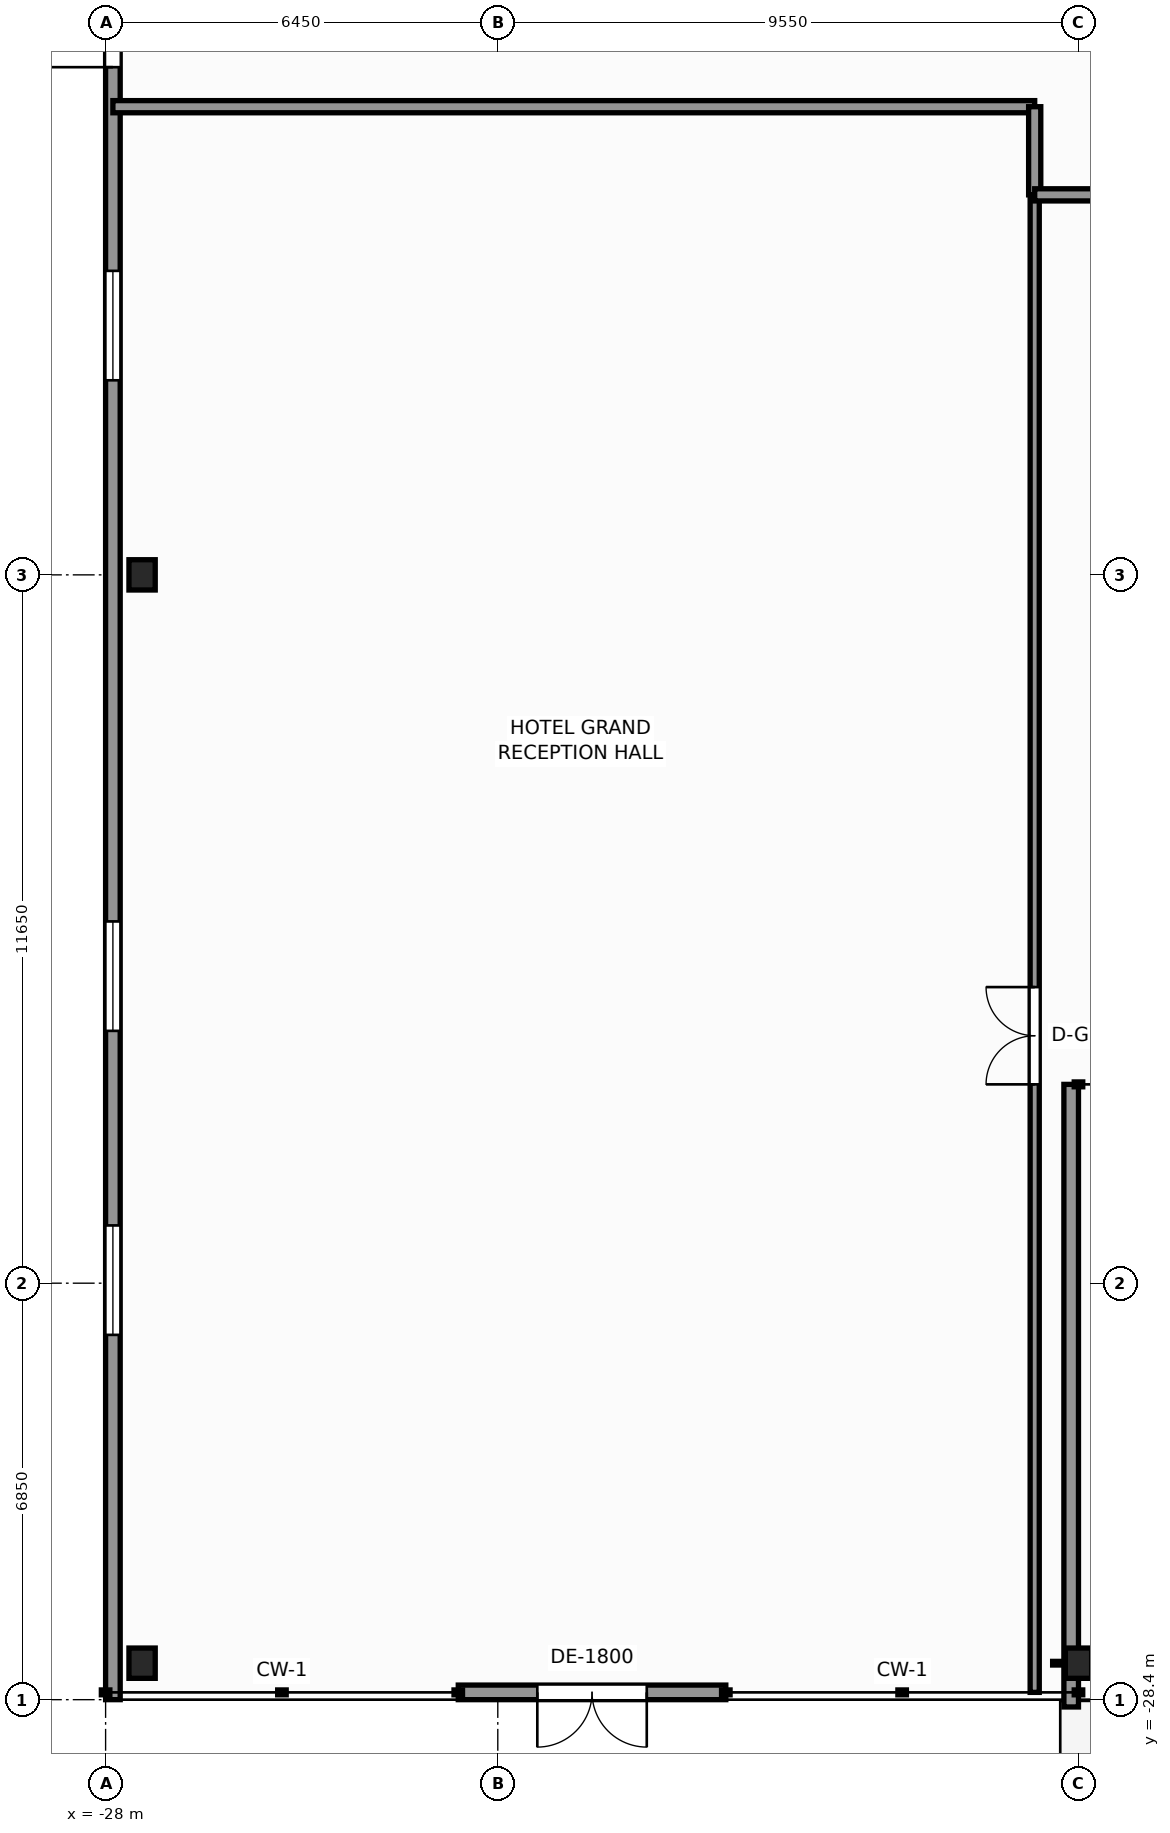
"""IFC4 building model, lengths in metres.
Left out: names, types, materials, properties, quantities, classifications, styles, units other than length and angle.
Written with IfcOpenShell. Run it as: python <this file> out.ifc"""

import sys

from ifc_helpers import new_model, si_unit, direction, frame, frame_2d, origin, origin_2d, place, context, subcontext, project, spatial, rectangle, i_section, extrude, element, fill, save


model = new_model("IFC4")
c1 = context("Model", 3, precision=1e-05, world=origin(), true_north=direction((0.0, 1.0)))
c2 = subcontext(c1, "Body", "Model", "MODEL_VIEW")
j1 = project(units=[si_unit("LENGTHUNIT", "METRE"), si_unit("PLANEANGLEUNIT", "RADIAN")], contexts=[c1])
p1 = place(None, origin())
s1 = spatial("IfcSite", under=j1, at=p1, CompositionType="ELEMENT")
p2 = place(p1, origin())
s2 = spatial("IfcBuilding", under=s1, at=p2, CompositionType="ELEMENT")
p3 = place(p2, origin())
s3 = spatial("IfcBuildingStorey", under=s2, at=p3, CompositionType="ELEMENT", Elevation=0.0)
for number, where, z_axis, x_axis in (
    (1, (-27.4, -27.8, 0.0), (0.0, 0.0, 1.0), (1.0, 0.0, 0.0)),
    (2, (-12.0, -27.8, 0.0), (0.0, 0.0, 1.0), (1.0, 0.0, 0.0)),
    (3, (-27.4, -9.9, 0.0), (0.0, 0.0, 1.0), (1.0, 0.0, 0.0)),
):
    element("IfcColumn", number, at=place(p3, frame(where, z_axis=z_axis, x_axis=x_axis)), inside=s3, PredefinedType="COLUMN", context=c2, shape_type="SweptSolid", body=[
        extrude(i_section(OverallWidth=0.432, OverallDepth=0.498, WebThickness=0.056, FlangeThickness=0.089, FilletRadius=0.025, at=origin_2d()), origin(), (0.0, 0.0, 1.0), 5.5),
    ])
p4 = place(p3, frame((-17.8, -28.28, 0.0), z_axis=(0.0, 0.0, 1.0), x_axis=(-1.0, 0.0, 0.0)))
e4 = element("IfcWall", 4, at=p4, inside=s3, PredefinedType="STANDARD", context=c2, shape_type="SweptSolid", body=[
    extrude(rectangle(XDim=4.4, YDim=0.24, at=frame_2d((2.2, 0.0))), origin(), (0.0, 0.0, 1.0), 5.22),
])
p5 = place(p4, frame((1.3, 0.0, 0.0)))
e5 = element("IfcOpeningElement", 5, at=p5, cuts=e4, PredefinedType="OPENING", context=c2, shape_type="SweptSolid", body=[
    extrude(rectangle(XDim=1.8, YDim=2.3, at=frame_2d((0.9, 1.15))), frame((0.0, 0.13, 0.0), z_axis=(0.0, -1.0, 0.0), x_axis=(1.0, 0.0, 0.0)), (0.0, 0.0, 1.0), 0.26),
])
p6 = place(p3, frame((-12.12, -18.28, 0.0), z_axis=(0.0, 0.0, 1.0), x_axis=(0.0, -1.0, 0.0)))
e6 = element("IfcWall", 6, at=p6, inside=s3, PredefinedType="STANDARD", context=c2, shape_type="SweptSolid", body=[
    extrude(rectangle(XDim=10.24, YDim=0.24, at=frame_2d((5.12, 0.0))), origin(), (0.0, 0.0, 1.0), 4.288),
])
p7 = place(p3, frame((-27.88, -28.4, 0.0), z_axis=(0.0, 0.0, 1.0), x_axis=(0.0, 1.0, 0.0)))
e7 = element("IfcWall", 7, at=p7, inside=s3, PredefinedType="STANDARD", context=c2, shape_type="SweptSolid", body=[
    extrude(rectangle(XDim=56.8, YDim=0.24, at=frame_2d((28.4, 0.0))), origin(), (0.0, 0.0, 1.0), 4.748),
])
p8 = place(p7, frame((26.85, 0.0, 0.0)))
e8 = element("IfcOpeningElement", 8, at=p8, cuts=e7, PredefinedType="OPENING", context=c2, shape_type="SweptSolid", body=[
    extrude(rectangle(XDim=1.1, YDim=2.2, at=frame_2d((0.55, 1.1))), frame((0.0, 0.13, 0.0), z_axis=(0.0, -1.0, 0.0), x_axis=(1.0, 0.0, 0.0)), (0.0, 0.0, 1.0), 0.26),
])
p9 = place(p7, frame((40.45, 0.0, 0.0)))
e9 = element("IfcOpeningElement", 9, at=p9, cuts=e7, PredefinedType="OPENING", context=c2, shape_type="SweptSolid", body=[
    extrude(rectangle(XDim=1.1, YDim=2.2, at=frame_2d((0.55, 1.1))), frame((0.0, 0.13, 0.0), z_axis=(0.0, -1.0, 0.0), x_axis=(1.0, 0.0, 0.0)), (0.0, 0.0, 1.0), 0.26),
])
p10 = place(p7, frame((47.35, 0.0, 0.0)))
e10 = element("IfcOpeningElement", 10, at=p10, cuts=e7, PredefinedType="OPENING", context=c2, shape_type="SweptSolid", body=[
    extrude(rectangle(XDim=1.1, YDim=2.2, at=frame_2d((0.55, 1.1))), frame((0.0, 0.13, 0.0), z_axis=(0.0, -1.0, 0.0), x_axis=(1.0, 0.0, 0.0)), (0.0, 0.0, 1.0), 0.26),
])
p11 = place(p7, frame((6.0, 0.0, 0.75)))
e11 = element("IfcOpeningElement", 11, at=p11, cuts=e7, PredefinedType="OPENING", context=c2, shape_type="SweptSolid", body=[
    extrude(rectangle(XDim=1.8, YDim=2.4, at=frame_2d((0.9, 1.2))), frame((0.0, 0.13, 0.0), z_axis=(0.0, -1.0, 0.0), x_axis=(1.0, 0.0, 0.0)), (0.0, 0.0, 1.0), 0.26),
])
p12 = place(p7, frame((11.0, 0.0, 0.75)))
e12 = element("IfcOpeningElement", 12, at=p12, cuts=e7, PredefinedType="OPENING", context=c2, shape_type="SweptSolid", body=[
    extrude(rectangle(XDim=1.8, YDim=2.4, at=frame_2d((0.9, 1.2))), frame((0.0, 0.13, 0.0), z_axis=(0.0, -1.0, 0.0), x_axis=(1.0, 0.0, 0.0)), (0.0, 0.0, 1.0), 0.26),
])
p13 = place(p7, frame((21.7, 0.0, 0.75)))
e13 = element("IfcOpeningElement", 13, at=p13, cuts=e7, PredefinedType="OPENING", context=c2, shape_type="SweptSolid", body=[
    extrude(rectangle(XDim=1.8, YDim=2.4, at=frame_2d((0.9, 1.2))), frame((0.0, 0.13, 0.0), z_axis=(0.0, -1.0, 0.0), x_axis=(1.0, 0.0, 0.0)), (0.0, 0.0, 1.0), 0.26),
])
p14 = place(p3, frame((-12.72, -28.28, 0.0), z_axis=(0.0, 0.0, 1.0), x_axis=(0.0, 1.0, 0.0)))
e14 = element("IfcWall", 14, at=p14, inside=s3, PredefinedType="PARTITIONING", context=c2, shape_type="SweptSolid", body=[
    extrude(rectangle(XDim=24.63, YDim=0.15, at=frame_2d((12.315, 0.0))), origin(), (0.0, 0.0, 1.0), 4.278),
])
p15 = place(p14, frame((10.0, 0.0, 0.0)))
e15 = element("IfcOpeningElement", 15, at=p15, cuts=e14, PredefinedType="OPENING", context=c2, shape_type="SweptSolid", body=[
    extrude(rectangle(XDim=1.6, YDim=2.3, at=frame_2d((0.8, 1.15))), frame((0.0, 0.085, 0.0), z_axis=(0.0, -1.0, 0.0), x_axis=(1.0, 0.0, 0.0)), (0.0, 0.0, 1.0), 0.17),
])
p16 = place(p3, frame((-27.88, -2.2, 0.0), z_axis=(0.0, 0.0, 1.0), x_axis=(1.0, 0.0, 0.0)))
e16 = element("IfcWall", 16, at=p16, inside=s3, PredefinedType="SOLIDWALL", context=c2, shape_type="SweptSolid", body=[
    extrude(rectangle(XDim=15.16, YDim=0.2, at=frame_2d((7.58, 0.0))), origin(), (0.0, 0.0, 1.0), 4.589),
])
p17 = place(p3, frame((-12.72, -3.65, 0.0), z_axis=(0.0, 0.0, 1.0), x_axis=(0.0, 1.0, 0.0)))
e17 = element("IfcWall", 17, at=p17, inside=s3, PredefinedType="SOLIDWALL", context=c2, shape_type="SweptSolid", body=[
    extrude(rectangle(XDim=1.45, YDim=0.2, at=frame_2d((0.725, 0.0))), origin(), (0.0, 0.0, 1.0), 4.745),
])
p18 = place(p3, frame((-12.72, -3.65, 0.0), z_axis=(0.0, 0.0, 1.0), x_axis=(1.0, 0.0, 0.0)))
e18 = element("IfcWall", 18, at=p18, inside=s3, PredefinedType="SOLIDWALL", context=c2, shape_type="SweptSolid", body=[
    extrude(rectangle(XDim=2.82, YDim=0.2, at=frame_2d((1.41, 0.0))), origin(), (0.0, 0.0, 1.0), 4.255),
])
p19 = place(p5, origin())
e19 = element("IfcDoor", 19, at=p19, inside=s3, OperationType="DOUBLE_DOOR_SINGLE_SWING", PredefinedType="DOOR", context=c2, shape_type="SweptSolid", body=[
    extrude(rectangle(XDim=1.8, YDim=2.3, at=frame_2d((0.9, 1.15))), frame((0.0, 0.025, 0.0), z_axis=(0.0, -1.0, 0.0), x_axis=(1.0, 0.0, 0.0)), (0.0, 0.0, 1.0), 0.05),
])
fill(e5, e19)
p20 = place(p8, origin())
e20 = element("IfcDoor", 20, at=p20, inside=s3, OperationType="SINGLE_SWING_LEFT", PredefinedType="DOOR", context=c2, shape_type="SweptSolid", body=[
    extrude(rectangle(XDim=1.1, YDim=2.2, at=frame_2d((0.55, 1.1))), frame((0.0, 0.025, 0.0), z_axis=(0.0, -1.0, 0.0), x_axis=(1.0, 0.0, 0.0)), (0.0, 0.0, 1.0), 0.05),
])
fill(e8, e20)
p21 = place(p11, origin())
e21 = element("IfcWindow", 21, at=p21, inside=s3, PartitioningType="SINGLE_PANEL", PredefinedType="WINDOW", context=c2, shape_type="SweptSolid", body=[
    extrude(rectangle(XDim=1.8, YDim=2.4, at=frame_2d((0.9, 1.2))), frame((0.0, 0.03, 0.0), z_axis=(0.0, -1.0, 0.0), x_axis=(1.0, 0.0, 0.0)), (0.0, 0.0, 1.0), 0.06),
])
fill(e11, e21)
p22 = place(p12, origin())
e22 = element("IfcWindow", 22, at=p22, inside=s3, PartitioningType="SINGLE_PANEL", PredefinedType="WINDOW", context=c2, shape_type="SweptSolid", body=[
    extrude(rectangle(XDim=1.8, YDim=2.4, at=frame_2d((0.9, 1.2))), frame((0.0, 0.03, 0.0), z_axis=(0.0, -1.0, 0.0), x_axis=(1.0, 0.0, 0.0)), (0.0, 0.0, 1.0), 0.06),
])
fill(e12, e22)
p23 = place(p13, origin())
e23 = element("IfcWindow", 23, at=p23, inside=s3, PartitioningType="SINGLE_PANEL", PredefinedType="WINDOW", context=c2, shape_type="SweptSolid", body=[
    extrude(rectangle(XDim=1.8, YDim=2.4, at=frame_2d((0.9, 1.2))), frame((0.0, 0.03, 0.0), z_axis=(0.0, -1.0, 0.0), x_axis=(1.0, 0.0, 0.0)), (0.0, 0.0, 1.0), 0.06),
])
fill(e13, e23)
p24 = place(p15, origin())
e24 = element("IfcDoor", 24, at=p24, inside=s3, OperationType="DOUBLE_DOOR_SINGLE_SWING", PredefinedType="DOOR", context=c2, shape_type="SweptSolid", body=[
    extrude(rectangle(XDim=1.6, YDim=2.3, at=frame_2d((0.8, 1.15))), frame((0.0, 0.025, 0.0), z_axis=(0.0, -1.0, 0.0), x_axis=(1.0, 0.0, 0.0)), (0.0, 0.0, 1.0), 0.05),
])
fill(e15, e24)
save(model, sys.argv[1])
